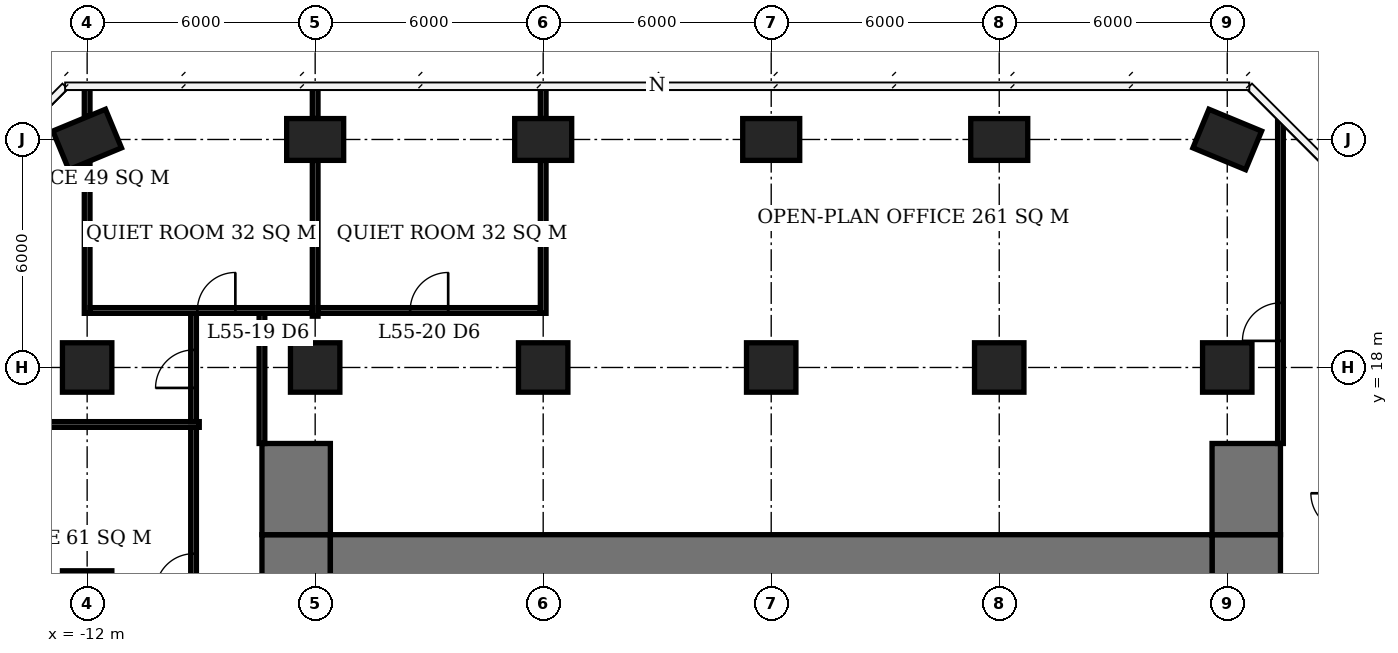
"""IFC4 building model, lengths in metres.
Left out: names, types, materials, properties, quantities, classifications, styles, units other than length and angle.
Written with IfcOpenShell. Run it as: python <this file> out.ifc"""

import sys

from ifc_helpers import new_model, si_unit, direction, frame, frame_2d, origin, origin_2d, place, context, subcontext, project, spatial, rectangle, extrude, element, fill, save


model = new_model("IFC4")
c1 = context("Model", 3, precision=1e-05, world=origin(), true_north=direction((0.0, 1.0)))
c2 = subcontext(c1, "Body", "Model", "MODEL_VIEW")
j1 = project(units=[si_unit("LENGTHUNIT", "METRE"), si_unit("PLANEANGLEUNIT", "RADIAN")], contexts=[c1])
p1 = place(None, origin())
s1 = spatial("IfcSite", under=j1, at=p1, CompositionType="ELEMENT")
p2 = place(p1, origin())
s2 = spatial("IfcBuilding", under=s1, at=p2, CompositionType="ELEMENT")
p3 = place(p2, frame((0.0, 0.0, 224.0)))
s3 = spatial("IfcBuildingStorey", under=s2, at=p3, CompositionType="ELEMENT", Elevation=224.0)
for number, where, z_axis, x_axis in (
    (1, (-12.0, 12.0, 0.0), (0.0, 0.0, 1.0), (1.0, 0.0, 0.0)),
    (2, (-12.0, 18.0, 0.0), (0.0, 0.0, 1.0), (1.0, 0.0, 0.0)),
):
    element("IfcColumn", number, at=place(p3, frame(where, z_axis=z_axis, x_axis=x_axis)), inside=s3, PredefinedType="COLUMN", context=c2, shape_type="SweptSolid", body=[
        extrude(rectangle(XDim=1.3, YDim=1.3, at=origin_2d()), origin(), (0.0, 0.0, 1.0), 3.9),
    ])
p4 = place(p3, frame((-12.0, 24.0, 0.0), z_axis=(0.0, 0.0, 1.0), x_axis=(0.923879532511, 0.382683432365, 0.0)))
e3 = element("IfcColumn", 3, at=p4, inside=s3, PredefinedType="COLUMN", context=c2, shape_type="SweptSolid", body=[
    extrude(rectangle(XDim=1.5, YDim=1.1, at=origin_2d()), origin(), (0.0, 0.0, 1.0), 3.9),
])
p5 = place(p3, frame((-6.0, 18.0, 0.0), z_axis=(0.0, 0.0, 1.0), x_axis=(1.0, 0.0, 0.0)))
e4 = element("IfcColumn", 4, at=p5, inside=s3, PredefinedType="COLUMN", context=c2, shape_type="SweptSolid", body=[
    extrude(rectangle(XDim=1.3, YDim=1.3, at=origin_2d()), origin(), (0.0, 0.0, 1.0), 3.9),
])
p6 = place(p3, frame((-6.0, 24.0, 0.0), z_axis=(0.0, 0.0, 1.0), x_axis=(1.0, 0.0, 0.0)))
e5 = element("IfcColumn", 5, at=p6, inside=s3, PredefinedType="COLUMN", context=c2, shape_type="SweptSolid", body=[
    extrude(rectangle(XDim=1.5, YDim=1.1, at=origin_2d()), origin(), (0.0, 0.0, 1.0), 3.9),
])
p7 = place(p3, frame((0.0, 18.0, 0.0), z_axis=(0.0, 0.0, 1.0), x_axis=(1.0, 0.0, 0.0)))
e6 = element("IfcColumn", 6, at=p7, inside=s3, PredefinedType="COLUMN", context=c2, shape_type="SweptSolid", body=[
    extrude(rectangle(XDim=1.3, YDim=1.3, at=origin_2d()), origin(), (0.0, 0.0, 1.0), 3.9),
])
p8 = place(p3, frame((0.0, 24.0, 0.0), z_axis=(0.0, 0.0, 1.0), x_axis=(1.0, 0.0, 0.0)))
e7 = element("IfcColumn", 7, at=p8, inside=s3, PredefinedType="COLUMN", context=c2, shape_type="SweptSolid", body=[
    extrude(rectangle(XDim=1.5, YDim=1.1, at=origin_2d()), origin(), (0.0, 0.0, 1.0), 3.9),
])
p9 = place(p3, frame((6.0, 18.0, 0.0), z_axis=(0.0, 0.0, 1.0), x_axis=(1.0, 0.0, 0.0)))
e8 = element("IfcColumn", 8, at=p9, inside=s3, PredefinedType="COLUMN", context=c2, shape_type="SweptSolid", body=[
    extrude(rectangle(XDim=1.3, YDim=1.3, at=origin_2d()), origin(), (0.0, 0.0, 1.0), 3.9),
])
p10 = place(p3, frame((6.0, 24.0, 0.0), z_axis=(0.0, 0.0, 1.0), x_axis=(1.0, 0.0, 0.0)))
e9 = element("IfcColumn", 9, at=p10, inside=s3, PredefinedType="COLUMN", context=c2, shape_type="SweptSolid", body=[
    extrude(rectangle(XDim=1.5, YDim=1.1, at=origin_2d()), origin(), (0.0, 0.0, 1.0), 3.9),
])
p11 = place(p3, frame((12.0, 18.0, 0.0), z_axis=(0.0, 0.0, 1.0), x_axis=(1.0, 0.0, 0.0)))
e10 = element("IfcColumn", 10, at=p11, inside=s3, PredefinedType="COLUMN", context=c2, shape_type="SweptSolid", body=[
    extrude(rectangle(XDim=1.3, YDim=1.3, at=origin_2d()), origin(), (0.0, 0.0, 1.0), 3.9),
])
p12 = place(p3, frame((12.0, 24.0, 0.0), z_axis=(0.0, 0.0, 1.0), x_axis=(1.0, 0.0, 0.0)))
e11 = element("IfcColumn", 11, at=p12, inside=s3, PredefinedType="COLUMN", context=c2, shape_type="SweptSolid", body=[
    extrude(rectangle(XDim=1.5, YDim=1.1, at=origin_2d()), origin(), (0.0, 0.0, 1.0), 3.9),
])
p13 = place(p3, frame((18.0, 18.0, 0.0), z_axis=(0.0, 0.0, 1.0), x_axis=(1.0, 0.0, 0.0)))
e12 = element("IfcColumn", 12, at=p13, inside=s3, PredefinedType="COLUMN", context=c2, shape_type="SweptSolid", body=[
    extrude(rectangle(XDim=1.3, YDim=1.3, at=origin_2d()), origin(), (0.0, 0.0, 1.0), 3.9),
])
p14 = place(p3, frame((18.0, 24.0, 0.0), z_axis=(0.0, 0.0, 1.0), x_axis=(0.923879532511, -0.382683432365, 0.0)))
e13 = element("IfcColumn", 13, at=p14, inside=s3, PredefinedType="COLUMN", context=c2, shape_type="SweptSolid", body=[
    extrude(rectangle(XDim=1.5, YDim=1.1, at=origin_2d()), origin(), (0.0, 0.0, 1.0), 3.9),
])
p15 = place(p3, frame((-5.6, 12.6, 0.0), z_axis=(0.0, 0.0, 1.0), x_axis=(1.0, 0.0, 0.0)))
e14 = element("IfcWall", 14, at=p15, inside=s3, PredefinedType="SHEAR", context=c2, shape_type="SweptSolid", body=[
    extrude(rectangle(XDim=23.2, YDim=2.0, at=frame_2d((11.6, 0.0))), origin(), (0.0, 0.0, 1.0), 3.9),
])
p16 = place(p3, frame((-6.5, -7.6, 0.0), z_axis=(0.0, 0.0, 1.0), x_axis=(0.0, 1.0, 0.0)))
e15 = element("IfcWall", 15, at=p16, inside=s3, PredefinedType="SHEAR", context=c2, shape_type="SweptSolid", body=[
    extrude(rectangle(XDim=21.2, YDim=1.8, at=frame_2d((10.6, 0.0))), origin(), (0.0, 0.0, 1.0), 3.9),
])
p17 = place(p16, frame((7.8, 0.0, 0.0)))
e16 = element("IfcOpeningElement", 16, at=p17, cuts=e15, PredefinedType="OPENING", context=c2, shape_type="SweptSolid", body=[
    extrude(rectangle(XDim=1.8, YDim=2.4, at=frame_2d((0.9, 1.2))), frame((0.0, 0.91, 0.0), z_axis=(0.0, -1.0, 0.0), x_axis=(1.0, 0.0, 0.0)), (0.0, 0.0, 1.0), 1.82),
])
p18 = place(p3, frame((18.5, -7.6, 0.0), z_axis=(0.0, 0.0, 1.0), x_axis=(0.0, 1.0, 0.0)))
e17 = element("IfcWall", 17, at=p18, inside=s3, PredefinedType="SHEAR", context=c2, shape_type="SweptSolid", body=[
    extrude(rectangle(XDim=21.2, YDim=1.8, at=frame_2d((10.6, 0.0))), origin(), (0.0, 0.0, 1.0), 3.9),
])
p19 = place(p18, frame((9.2, 0.0, 0.0)))
e18 = element("IfcOpeningElement", 18, at=p19, cuts=e17, PredefinedType="OPENING", context=c2, shape_type="SweptSolid", body=[
    extrude(rectangle(XDim=1.8, YDim=2.4, at=frame_2d((0.9, 1.2))), frame((0.0, 0.91, 0.0), z_axis=(0.0, -1.0, 0.0), x_axis=(1.0, 0.0, 0.0)), (0.0, 0.0, 1.0), 1.82),
])
for number, where, z_axis, x_axis in (
    (19, (-6.5, 13.6, 0.0), (0.0, 0.0, 1.0), (0.0, 1.0, 0.0)),
    (20, (18.5, 13.6, 0.0), (0.0, 0.0, 1.0), (0.0, 1.0, 0.0)),
):
    element("IfcWall", number, at=place(p3, frame(where, z_axis=z_axis, x_axis=x_axis)), inside=s3, PredefinedType="SHEAR", context=c2, shape_type="SweptSolid", body=[
        extrude(rectangle(XDim=2.4, YDim=1.8, at=frame_2d((1.2, 0.0))), origin(), (0.0, 0.0, 1.0), 3.9),
    ])
p20 = place(p3, frame((-11.925, 19.5, 0.0), z_axis=(0.0, 0.0, 1.0), x_axis=(1.0, 0.0, 0.0)))
e21 = element("IfcWall", 21, at=p20, inside=s3, PredefinedType="PARTITIONING", context=c2, shape_type="SweptSolid", body=[
    extrude(rectangle(XDim=5.85, YDim=0.15, at=frame_2d((2.925, 0.0))), origin(), (0.0, 0.0, 1.0), 3.65),
])
p21 = place(p20, frame((2.825, 0.0, 0.0)))
e22 = element("IfcOpeningElement", 22, at=p21, cuts=e21, PredefinedType="OPENING", context=c2, shape_type="SweptSolid", body=[
    extrude(rectangle(XDim=1.0, YDim=2.1, at=frame_2d((0.5, 1.05))), frame((0.0, 0.085, 0.0), z_axis=(0.0, -1.0, 0.0), x_axis=(1.0, 0.0, 0.0)), (0.0, 0.0, 1.0), 0.17),
])
p22 = place(p3, frame((-5.925, 19.5, 0.0), z_axis=(0.0, 0.0, 1.0), x_axis=(1.0, 0.0, 0.0)))
e23 = element("IfcWall", 23, at=p22, inside=s3, PredefinedType="PARTITIONING", context=c2, shape_type="SweptSolid", body=[
    extrude(rectangle(XDim=5.85, YDim=0.15, at=frame_2d((2.925, 0.0))), origin(), (0.0, 0.0, 1.0), 3.65),
])
p23 = place(p22, frame((2.425, 0.0, 0.0)))
e24 = element("IfcOpeningElement", 24, at=p23, cuts=e23, PredefinedType="OPENING", context=c2, shape_type="SweptSolid", body=[
    extrude(rectangle(XDim=1.0, YDim=2.1, at=frame_2d((0.5, 1.05))), frame((0.0, 0.085, 0.0), z_axis=(0.0, -1.0, 0.0), x_axis=(1.0, 0.0, 0.0)), (0.0, 0.0, 1.0), 0.17),
])
p24 = place(p3, frame((-12.0, 19.425, 0.0), z_axis=(0.0, 0.0, 1.0), x_axis=(0.0, 1.0, 0.0)))
e25 = element("IfcWall", 25, at=p24, inside=s3, PredefinedType="PARTITIONING", context=c2, shape_type="SweptSolid", body=[
    extrude(rectangle(XDim=3.948, YDim=0.15, at=frame_2d((1.974, 0.0))), origin(), (0.0, 0.0, 1.0), 3.65),
])
p25 = place(p3, frame((-12.0, 24.626, 0.0), z_axis=(0.0, 0.0, 1.0), x_axis=(0.0, 1.0, 0.0)))
e26 = element("IfcWall", 26, at=p25, inside=s3, PredefinedType="PARTITIONING", context=c2, shape_type="SweptSolid", body=[
    extrude(rectangle(XDim=0.773, YDim=0.15, at=frame_2d((0.387, 0.0))), origin(), (0.0, 0.0, 1.0), 3.65),
])
p26 = place(p3, frame((-6.0, 19.35, 0.0), z_axis=(0.0, 0.0, 1.0), x_axis=(0.0, 1.0, 0.0)))
e27 = element("IfcWall", 27, at=p26, inside=s3, PredefinedType="PARTITIONING", context=c2, shape_type="SweptSolid", body=[
    extrude(rectangle(XDim=4.1, YDim=0.15, at=frame_2d((2.05, 0.0))), origin(), (0.0, 0.0, 1.0), 3.65),
])
p27 = place(p3, frame((-6.0, 24.55, 0.0), z_axis=(0.0, 0.0, 1.0), x_axis=(0.0, 1.0, 0.0)))
e28 = element("IfcWall", 28, at=p27, inside=s3, PredefinedType="PARTITIONING", context=c2, shape_type="SweptSolid", body=[
    extrude(rectangle(XDim=0.85, YDim=0.15, at=frame_2d((0.425, 0.0))), origin(), (0.0, 0.0, 1.0), 3.65),
])
p28 = place(p3, frame((0.0, 19.425, 0.0), z_axis=(0.0, 0.0, 1.0), x_axis=(0.0, 1.0, 0.0)))
e29 = element("IfcWall", 29, at=p28, inside=s3, PredefinedType="PARTITIONING", context=c2, shape_type="SweptSolid", body=[
    extrude(rectangle(XDim=4.025, YDim=0.15, at=frame_2d((2.012, 0.0))), origin(), (0.0, 0.0, 1.0), 3.65),
])
p29 = place(p3, frame((0.0, 24.55, 0.0), z_axis=(0.0, 0.0, 1.0), x_axis=(0.0, 1.0, 0.0)))
e30 = element("IfcWall", 30, at=p29, inside=s3, PredefinedType="PARTITIONING", context=c2, shape_type="SweptSolid", body=[
    extrude(rectangle(XDim=0.8, YDim=0.15, at=frame_2d((0.4, 0.0))), origin(), (0.0, 0.0, 1.0), 3.65),
])
p30 = place(p3, frame((-15.59, 16.5, 0.0), z_axis=(0.0, 0.0, 1.0), x_axis=(1.0, 0.0, 0.0)))
e31 = element("IfcWall", 31, at=p30, inside=s3, PredefinedType="PARTITIONING", context=c2, shape_type="SweptSolid", body=[
    extrude(rectangle(XDim=6.54, YDim=0.15, at=frame_2d((3.27, 0.0))), origin(), (0.0, 0.0, 1.0), 3.65),
])
p31 = place(p3, frame((-9.2, 10.575, 0.0), z_axis=(0.0, 0.0, 1.0), x_axis=(0.0, 1.0, 0.0)))
e32 = element("IfcWall", 32, at=p31, inside=s3, PredefinedType="PARTITIONING", context=c2, shape_type="SweptSolid", body=[
    extrude(rectangle(XDim=5.85, YDim=0.15, at=frame_2d((2.925, 0.0))), origin(), (0.0, 0.0, 1.0), 3.65),
])
p32 = place(p31, frame((1.525, 0.0, 0.0)))
e33 = element("IfcOpeningElement", 33, at=p32, cuts=e32, PredefinedType="OPENING", context=c2, shape_type="SweptSolid", body=[
    extrude(rectangle(XDim=1.0, YDim=2.1, at=frame_2d((0.5, 1.05))), frame((0.0, 0.085, 0.0), z_axis=(0.0, -1.0, 0.0), x_axis=(1.0, 0.0, 0.0)), (0.0, 0.0, 1.0), 0.17),
])
p33 = place(p3, frame((-9.2, 16.575, 0.0), z_axis=(0.0, 0.0, 1.0), x_axis=(0.0, 1.0, 0.0)))
e34 = element("IfcWall", 34, at=p33, inside=s3, PredefinedType="PARTITIONING", context=c2, shape_type="SweptSolid", body=[
    extrude(rectangle(XDim=2.85, YDim=0.15, at=frame_2d((1.425, 0.0))), origin(), (0.0, 0.0, 1.0), 3.65),
])
p34 = place(p33, frame((0.887, 0.0, 0.0)))
e35 = element("IfcOpeningElement", 35, at=p34, cuts=e34, PredefinedType="OPENING", context=c2, shape_type="SweptSolid", body=[
    extrude(rectangle(XDim=1.0, YDim=2.1, at=frame_2d((0.5, 1.05))), frame((0.0, 0.085, 0.0), z_axis=(0.0, -1.0, 0.0), x_axis=(1.0, 0.0, 0.0)), (0.0, 0.0, 1.0), 0.17),
])
p35 = place(p3, frame((-7.4, 16.0, 0.0), z_axis=(0.0, 0.0, 1.0), x_axis=(0.0, 1.0, 0.0)))
e36 = element("IfcWall", 36, at=p35, inside=s3, PredefinedType="PARTITIONING", context=c2, shape_type="SweptSolid", body=[
    extrude(rectangle(XDim=3.425, YDim=0.15, at=frame_2d((1.712, 0.0))), origin(), (0.0, 0.0, 1.0), 3.65),
])
p36 = place(p3, frame((19.4, 16.0, 0.0), z_axis=(0.0, 0.0, 1.0), x_axis=(0.0, 1.0, 0.0)))
e37 = element("IfcWall", 37, at=p36, inside=s3, PredefinedType="PARTITIONING", context=c2, shape_type="SweptSolid", body=[
    extrude(rectangle(XDim=8.489, YDim=0.15, at=frame_2d((4.245, 0.0))), origin(), (0.0, 0.0, 1.0), 3.65),
])
p37 = place(p36, frame((2.7, 0.0, 0.0)))
e38 = element("IfcOpeningElement", 38, at=p37, cuts=e37, PredefinedType="OPENING", context=c2, shape_type="SweptSolid", body=[
    extrude(rectangle(XDim=1.0, YDim=2.1, at=frame_2d((0.5, 1.05))), frame((0.0, 0.085, 0.0), z_axis=(0.0, -1.0, 0.0), x_axis=(1.0, 0.0, 0.0)), (0.0, 0.0, 1.0), 0.17),
])
p38 = place(p21, origin())
e39 = element("IfcDoor", 39, at=p38, inside=s3, OperationType="SINGLE_SWING_RIGHT", PredefinedType="DOOR", context=c2, shape_type="SweptSolid", body=[
    extrude(rectangle(XDim=1.0, YDim=2.1, at=frame_2d((0.5, 1.05))), frame((0.0, 0.025, 0.0), z_axis=(0.0, -1.0, 0.0), x_axis=(1.0, 0.0, 0.0)), (0.0, 0.0, 1.0), 0.05),
])
fill(e22, e39)
p39 = place(p23, origin())
e40 = element("IfcDoor", 40, at=p39, inside=s3, OperationType="SINGLE_SWING_RIGHT", PredefinedType="DOOR", context=c2, shape_type="SweptSolid", body=[
    extrude(rectangle(XDim=1.0, YDim=2.1, at=frame_2d((0.5, 1.05))), frame((0.0, 0.025, 0.0), z_axis=(0.0, -1.0, 0.0), x_axis=(1.0, 0.0, 0.0)), (0.0, 0.0, 1.0), 0.05),
])
fill(e24, e40)
p40 = place(p32, origin())
e41 = element("IfcDoor", 41, at=p40, inside=s3, OperationType="SINGLE_SWING_LEFT", PredefinedType="DOOR", context=c2, shape_type="SweptSolid", body=[
    extrude(rectangle(XDim=1.0, YDim=2.1, at=frame_2d((0.5, 1.05))), frame((0.0, 0.025, 0.0), z_axis=(0.0, -1.0, 0.0), x_axis=(1.0, 0.0, 0.0)), (0.0, 0.0, 1.0), 0.05),
])
fill(e33, e41)
p41 = place(p37, origin())
e42 = element("IfcDoor", 42, at=p41, inside=s3, OperationType="SINGLE_SWING_LEFT", PredefinedType="DOOR", context=c2, shape_type="SweptSolid", body=[
    extrude(rectangle(XDim=1.0, YDim=2.1, at=frame_2d((0.5, 1.05))), frame((0.0, 0.025, 0.0), z_axis=(0.0, -1.0, 0.0), x_axis=(1.0, 0.0, 0.0)), (0.0, 0.0, 1.0), 0.05),
])
fill(e38, e42)
p42 = place(p34, origin())
e43 = element("IfcDoor", 43, at=p42, inside=s3, OperationType="SINGLE_SWING_LEFT", PredefinedType="DOOR", context=c2, shape_type="SweptSolid", body=[
    extrude(rectangle(XDim=1.0, YDim=2.1, at=frame_2d((0.5, 1.05))), frame((0.0, 0.025, 0.0), z_axis=(0.0, -1.0, 0.0), x_axis=(1.0, 0.0, 0.0)), (0.0, 0.0, 1.0), 0.05),
])
fill(e35, e43)
save(model, sys.argv[1])
